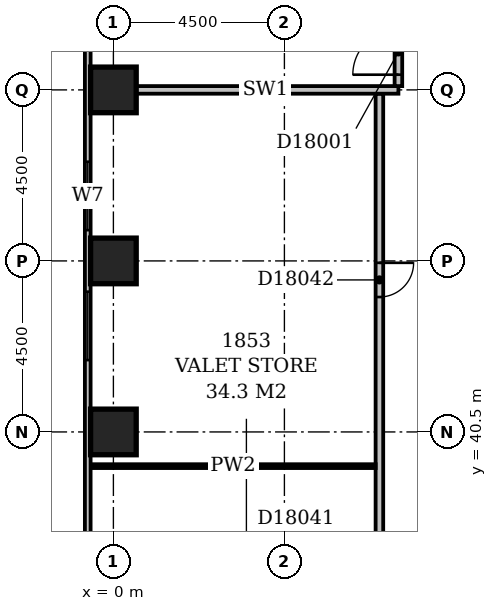
"""IFC4 building model, lengths in metres.
Left out: names, types, materials, properties, quantities, classifications, styles, units other than length and angle.
Written with IfcOpenShell. Run it as: python <this file> out.ifc"""

import sys

from ifc_helpers import new_model, si_unit, direction, frame, frame_2d, origin, origin_2d, place, context, subcontext, project, spatial, rectangle, extrude, element, fill, save


model = new_model("IFC4")
c1 = context("Model", 3, precision=1e-05, world=origin(), true_north=direction((0.0, 1.0)))
c2 = subcontext(c1, "Body", "Model", "MODEL_VIEW")
j1 = project(units=[si_unit("LENGTHUNIT", "METRE"), si_unit("PLANEANGLEUNIT", "RADIAN")], contexts=[c1])
p1 = place(None, origin())
s1 = spatial("IfcSite", under=j1, at=p1, CompositionType="ELEMENT")
p2 = place(p1, origin())
s2 = spatial("IfcBuilding", under=s1, at=p2, CompositionType="ELEMENT")
p3 = place(p2, frame((0.0, 0.0, 75.8)))
s3 = spatial("IfcBuildingStorey", under=s2, at=p3, CompositionType="ELEMENT", Elevation=75.8)
for number, where, z_axis, x_axis in (
    (1, (0.0, 40.5, -0.3), (0.0, 0.0, 1.0), (1.0, 0.0, 0.0)),
    (2, (0.0, 45.0, -0.3), (0.0, 0.0, 1.0), (1.0, 0.0, 0.0)),
    (3, (0.0, 49.5, -0.3), (0.0, 0.0, 1.0), (1.0, 0.0, 0.0)),
):
    element("IfcColumn", number, at=place(p3, frame(where, z_axis=z_axis, x_axis=x_axis)), inside=s3, PredefinedType="COLUMN", context=c2, shape_type="SweptSolid", body=[
        extrude(rectangle(XDim=1.2, YDim=1.2, at=origin_2d()), origin(), (0.0, 0.0, 1.0), 3.6),
    ])
p4 = place(p3, frame((-0.675, 59.1, 0.0), z_axis=(0.0, 0.0, 1.0), x_axis=(0.0, -1.0, 0.0)))
e4 = element("IfcWall", 4, at=p4, inside=s3, PredefinedType="STANDARD", context=c2, shape_type="SweptSolid", body=[
    extrude(rectangle(XDim=55.35, YDim=0.15, at=frame_2d((27.675, 0.0))), origin(), (0.0, 0.0, 1.0), 2.7),
])
p5 = place(p4, frame((11.49, 0.0, 0.6)))
e5 = element("IfcOpeningElement", 5, at=p5, cuts=e4, PredefinedType="OPENING", context=c2, shape_type="SweptSolid", body=[
    extrude(rectangle(XDim=1.8, YDim=1.8, at=frame_2d((0.9, 0.9))), frame((0.0, 0.087, 0.0), z_axis=(0.0, -1.0, 0.0), x_axis=(1.0, 0.0, 0.0)), (0.0, 0.0, 1.0), 0.174),
])
p6 = place(p4, frame((14.91, 0.0, 0.6)))
e6 = element("IfcOpeningElement", 6, at=p6, cuts=e4, PredefinedType="OPENING", context=c2, shape_type="SweptSolid", body=[
    extrude(rectangle(XDim=1.8, YDim=1.8, at=frame_2d((0.9, 0.9))), frame((0.0, 0.087, 0.0), z_axis=(0.0, -1.0, 0.0), x_axis=(1.0, 0.0, 0.0)), (0.0, 0.0, 1.0), 0.174),
])
p7 = place(p4, frame((41.91, 0.0, 0.6)))
e7 = element("IfcOpeningElement", 7, at=p7, cuts=e4, PredefinedType="OPENING", context=c2, shape_type="SweptSolid", body=[
    extrude(rectangle(XDim=1.8, YDim=1.8, at=frame_2d((0.9, 0.9))), frame((0.0, 0.087, 0.0), z_axis=(0.0, -1.0, 0.0), x_axis=(1.0, 0.0, 0.0)), (0.0, 0.0, 1.0), 0.174),
])
p8 = place(p3, frame((0.5, 49.5, 0.0), z_axis=(0.0, 0.0, 1.0), x_axis=(1.0, 0.0, 0.0)))
e8 = element("IfcWall", 8, at=p8, inside=s3, PredefinedType="PARTITIONING", context=c2, shape_type="SweptSolid", body=[
    extrude(rectangle(XDim=7.0, YDim=0.2, at=frame_2d((3.5, 0.0))), origin(), (0.0, 0.0, 1.0), 3.3),
])
p9 = place(p3, frame((7.5, 49.6, 0.0), z_axis=(0.0, 0.0, 1.0), x_axis=(0.0, 1.0, 0.0)))
e9 = element("IfcWall", 9, at=p9, inside=s3, PredefinedType="PARTITIONING", context=c2, shape_type="SweptSolid", body=[
    extrude(rectangle(XDim=3.9, YDim=0.2, at=frame_2d((1.95, 0.0))), origin(), (0.0, 0.0, 1.0), 3.3),
])
p10 = place(p9, frame((0.3, 0.0, 0.0)))
e10 = element("IfcOpeningElement", 10, at=p10, cuts=e9, PredefinedType="OPENING", context=c2, shape_type="SweptSolid", body=[
    extrude(rectangle(XDim=1.2, YDim=2.1, at=frame_2d((0.6, 1.05))), frame((0.0, 0.112, 0.0), z_axis=(0.0, -1.0, 0.0), x_axis=(1.0, 0.0, 0.0)), (0.0, 0.0, 1.0), 0.224),
])
p11 = place(p3, frame((7.0, 34.6, 0.0), z_axis=(0.0, 0.0, 1.0), x_axis=(0.0, 1.0, 0.0)))
e11 = element("IfcWall", 11, at=p11, inside=s3, PredefinedType="PARTITIONING", context=c2, shape_type="SweptSolid", body=[
    extrude(rectangle(XDim=14.8, YDim=0.2, at=frame_2d((7.4, 0.0))), origin(), (0.0, 0.0, 1.0), 3.3),
])
p12 = place(p11, frame((1.9, 0.0, 0.0)))
e12 = element("IfcOpeningElement", 12, at=p12, cuts=e11, PredefinedType="OPENING", context=c2, shape_type="SweptSolid", body=[
    extrude(rectangle(XDim=1.0, YDim=2.1, at=frame_2d((0.5, 1.05))), frame((0.0, 0.112, 0.0), z_axis=(0.0, -1.0, 0.0), x_axis=(1.0, 0.0, 0.0)), (0.0, 0.0, 1.0), 0.224),
])
p13 = place(p11, frame((9.45, 0.0, 0.0)))
e13 = element("IfcOpeningElement", 13, at=p13, cuts=e11, PredefinedType="OPENING", context=c2, shape_type="SweptSolid", body=[
    extrude(rectangle(XDim=0.9, YDim=2.1, at=frame_2d((0.45, 1.05))), frame((0.0, 0.112, 0.0), z_axis=(0.0, -1.0, 0.0), x_axis=(1.0, 0.0, 0.0)), (0.0, 0.0, 1.0), 0.224),
])
p14 = place(p3, frame((-0.6, 39.6, 0.0), z_axis=(0.0, 0.0, 1.0), x_axis=(1.0, 0.0, 0.0)))
e14 = element("IfcWall", 14, at=p14, inside=s3, PredefinedType="PARTITIONING", context=c2, shape_type="SweptSolid", body=[
    extrude(rectangle(XDim=7.5, YDim=0.1, at=frame_2d((3.75, 0.0))), origin(), (0.0, 0.0, 1.0), 3.3),
])
p15 = place(p5, origin())
e15 = element("IfcWindow", 15, at=p15, inside=s3, PartitioningType="SINGLE_PANEL", PredefinedType="WINDOW", context=c2, shape_type="SweptSolid", body=[
    extrude(rectangle(XDim=1.8, YDim=1.8, at=frame_2d((0.9, 0.9))), frame((0.0, 0.03, 0.0), z_axis=(0.0, -1.0, 0.0), x_axis=(1.0, 0.0, 0.0)), (0.0, 0.0, 1.0), 0.06),
])
fill(e5, e15)
p16 = place(p6, origin())
e16 = element("IfcWindow", 16, at=p16, inside=s3, PartitioningType="SINGLE_PANEL", PredefinedType="WINDOW", context=c2, shape_type="SweptSolid", body=[
    extrude(rectangle(XDim=1.8, YDim=1.8, at=frame_2d((0.9, 0.9))), frame((0.0, 0.03, 0.0), z_axis=(0.0, -1.0, 0.0), x_axis=(1.0, 0.0, 0.0)), (0.0, 0.0, 1.0), 0.06),
])
fill(e6, e16)
p17 = place(p10, origin())
e17 = element("IfcDoor", 17, at=p17, inside=s3, OperationType="SINGLE_SWING_LEFT", PredefinedType="DOOR", context=c2, shape_type="SweptSolid", body=[
    extrude(rectangle(XDim=1.2, YDim=2.1, at=frame_2d((0.6, 1.05))), frame((0.0, 0.025, 0.0), z_axis=(0.0, -1.0, 0.0), x_axis=(1.0, 0.0, 0.0)), (0.0, 0.0, 1.0), 0.05),
])
fill(e10, e17)
p18 = place(p13, origin())
e18 = element("IfcDoor", 18, at=p18, inside=s3, OperationType="SINGLE_SWING_RIGHT", PredefinedType="DOOR", context=c2, shape_type="SweptSolid", body=[
    extrude(rectangle(XDim=0.9, YDim=2.1, at=frame_2d((0.45, 1.05))), frame((0.0, 0.025, 0.0), z_axis=(0.0, -1.0, 0.0), x_axis=(1.0, 0.0, 0.0)), (0.0, 0.0, 1.0), 0.05),
])
fill(e13, e18)
save(model, sys.argv[1])
